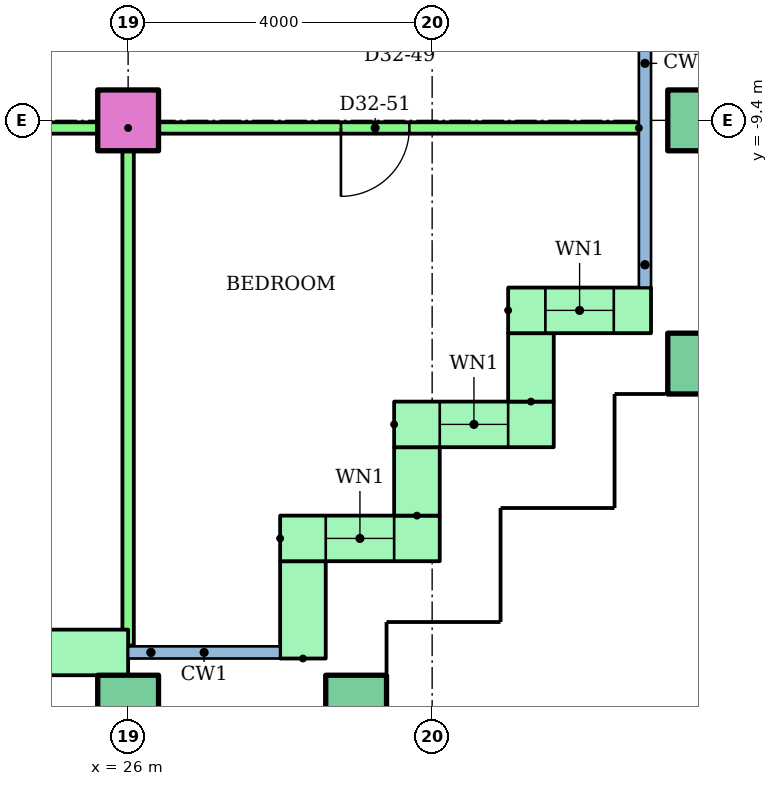
"""IFC4 building model, lengths in metres.
Left out: names, types, materials, properties, quantities, classifications, styles, units other than length and angle.
Written with IfcOpenShell. Run it as: python <this file> out.ifc"""

import sys

from ifc_helpers import new_model, si_unit, direction, frame, frame_2d, origin, origin_2d, place, context, subcontext, project, spatial, rectangle, hollow_rectangle, extrude, element, fill, save


model = new_model("IFC4")
c1 = context("Model", 3, precision=1e-05, world=origin(), true_north=direction((0.0, 1.0)))
c2 = subcontext(c1, "Body", "Model", "MODEL_VIEW")
j1 = project(units=[si_unit("LENGTHUNIT", "METRE"), si_unit("PLANEANGLEUNIT", "RADIAN")], contexts=[c1])
p1 = place(None, origin())
s1 = spatial("IfcSite", under=j1, at=p1, CompositionType="ELEMENT")
p2 = place(p1, origin())
s2 = spatial("IfcBuilding", under=s1, at=p2, CompositionType="ELEMENT")
p3 = place(p2, frame((0.0, 0.0, 126.2)))
s3 = spatial("IfcBuildingStorey", under=s2, at=p3, CompositionType="ELEMENT", Elevation=126.2)
for number, where in (
    (1, (26.0, -17.1, 0.0)),
    (2, (29.0, -17.1, 0.0)),
    (3, (33.5, -12.6, 0.0)),
):
    element("IfcColumn", number, at=place(p3, frame(where)), inside=s3, PredefinedType="COLUMN", context=c2, shape_type="SweptSolid", body=[
        extrude(hollow_rectangle(XDim=0.8, YDim=0.8, WallThickness=0.04, at=origin_2d()), origin(), (0.0, 0.0, 1.0), 3.2),
    ])
p4 = place(p3, frame((26.0, -9.4, 0.0)))
e4 = element("IfcColumn", 4, at=p4, inside=s3, PredefinedType="COLUMN", context=c2, shape_type="SweptSolid", body=[
    extrude(rectangle(XDim=0.8, YDim=0.8, at=origin_2d()), origin(), (0.0, 0.0, 1.0), 3.2),
])
p5 = place(p3, frame((33.5, -9.4, 0.0)))
e5 = element("IfcColumn", 5, at=p5, inside=s3, PredefinedType="COLUMN", context=c2, shape_type="SweptSolid", body=[
    extrude(hollow_rectangle(XDim=0.8, YDim=0.8, WallThickness=0.04, at=origin_2d()), origin(), (0.0, 0.0, 1.0), 3.2),
])
p6 = place(p3, frame((22.0, -16.4, 0.0)))
e6 = element("IfcWall", 6, at=p6, inside=s3, PredefinedType="STANDARD", context=c2, shape_type="SweptSolid", body=[
    extrude(rectangle(XDim=4.0, YDim=0.6, at=frame_2d((2.0, 0.0))), origin(), (0.0, 0.0, 1.0), 2.92),
])
p7 = place(p6, frame((1.4, 0.0, 0.0)))
e7 = element("IfcOpeningElement", 7, at=p7, cuts=e6, PredefinedType="OPENING", context=c2, shape_type="SweptSolid", body=[
    extrude(rectangle(XDim=1.2, YDim=2.1, at=frame_2d((0.6, 1.05))), frame((0.0, 0.31, 0.0), z_axis=(0.0, -1.0, 0.0), x_axis=(1.0, 0.0, 0.0)), (0.0, 0.0, 1.0), 0.62),
])
p8 = place(p3, frame((28.3, -16.48, 0.0), z_axis=(0.0, 0.0, 1.0), x_axis=(0.0, 1.0, 0.0)))
e8 = element("IfcWall", 8, at=p8, inside=s3, PredefinedType="STANDARD", context=c2, shape_type="SweptSolid", body=[
    extrude(rectangle(XDim=1.28, YDim=0.6, at=frame_2d((0.64, 0.0))), origin(), (0.0, 0.0, 1.0), 2.92),
])
p9 = place(p3, frame((28.0, -14.9, 0.0)))
e9 = element("IfcWall", 9, at=p9, inside=s3, PredefinedType="STANDARD", context=c2, shape_type="SweptSolid", body=[
    extrude(rectangle(XDim=2.1, YDim=0.6, at=frame_2d((1.05, 0.0))), origin(), (0.0, 0.0, 1.0), 2.92),
])
p10 = place(p9, frame((0.6, 0.0, 0.9)))
e10 = element("IfcOpeningElement", 10, at=p10, cuts=e9, PredefinedType="OPENING", context=c2, shape_type="SweptSolid", body=[
    extrude(rectangle(XDim=0.9, YDim=1.5, at=frame_2d((0.45, 0.75))), frame((0.0, 0.31, 0.0), z_axis=(0.0, -1.0, 0.0), x_axis=(1.0, 0.0, 0.0)), (0.0, 0.0, 1.0), 0.62),
])
p11 = place(p3, frame((29.8, -14.6, 0.0), z_axis=(0.0, 0.0, 1.0), x_axis=(0.0, 1.0, 0.0)))
e11 = element("IfcWall", 11, at=p11, inside=s3, PredefinedType="STANDARD", context=c2, shape_type="SweptSolid", body=[
    extrude(rectangle(XDim=0.9, YDim=0.6, at=frame_2d((0.45, 0.0))), origin(), (0.0, 0.0, 1.0), 2.92),
])
p12 = place(p3, frame((29.5, -13.4, 0.0)))
e12 = element("IfcWall", 12, at=p12, inside=s3, PredefinedType="STANDARD", context=c2, shape_type="SweptSolid", body=[
    extrude(rectangle(XDim=2.1, YDim=0.6, at=frame_2d((1.05, 0.0))), origin(), (0.0, 0.0, 1.0), 2.92),
])
p13 = place(p12, frame((0.6, 0.0, 0.9)))
e13 = element("IfcOpeningElement", 13, at=p13, cuts=e12, PredefinedType="OPENING", context=c2, shape_type="SweptSolid", body=[
    extrude(rectangle(XDim=0.9, YDim=1.5, at=frame_2d((0.45, 0.75))), frame((0.0, 0.31, 0.0), z_axis=(0.0, -1.0, 0.0), x_axis=(1.0, 0.0, 0.0)), (0.0, 0.0, 1.0), 0.62),
])
p14 = place(p3, frame((31.3, -13.1, 0.0), z_axis=(0.0, 0.0, 1.0), x_axis=(0.0, 1.0, 0.0)))
e14 = element("IfcWall", 14, at=p14, inside=s3, PredefinedType="STANDARD", context=c2, shape_type="SweptSolid", body=[
    extrude(rectangle(XDim=0.9, YDim=0.6, at=frame_2d((0.45, 0.0))), origin(), (0.0, 0.0, 1.0), 2.92),
])
p15 = place(p3, frame((31.0, -11.9, 0.0)))
e15 = element("IfcWall", 15, at=p15, inside=s3, PredefinedType="STANDARD", context=c2, shape_type="SweptSolid", body=[
    extrude(rectangle(XDim=1.88, YDim=0.6, at=frame_2d((0.94, 0.0))), origin(), (0.0, 0.0, 1.0), 2.92),
])
p16 = place(p15, frame((0.49, 0.0, 0.9)))
e16 = element("IfcOpeningElement", 16, at=p16, cuts=e15, PredefinedType="OPENING", context=c2, shape_type="SweptSolid", body=[
    extrude(rectangle(XDim=0.9, YDim=1.5, at=frame_2d((0.45, 0.75))), frame((0.0, 0.31, 0.0), z_axis=(0.0, -1.0, 0.0), x_axis=(1.0, 0.0, 0.0)), (0.0, 0.0, 1.0), 0.62),
])
p17 = place(p3, frame((32.72, -9.5, 0.0), z_axis=(0.0, 0.0, 1.0), x_axis=(-1.0, 0.0, 0.0)))
e17 = element("IfcWall", 17, at=p17, inside=s3, PredefinedType="PARTITIONING", context=c2, shape_type="SweptSolid", body=[
    extrude(rectangle(XDim=14.72, YDim=0.15, at=frame_2d((7.36, 0.0))), origin(), (0.0, 0.0, 1.0), 2.4),
])
p18 = place(p17, frame((10.22, 0.0, 0.0)))
e18 = element("IfcOpeningElement", 18, at=p18, cuts=e17, PredefinedType="OPENING", context=c2, shape_type="SweptSolid", body=[
    extrude(rectangle(XDim=1.0, YDim=2.1, at=frame_2d((0.5, 1.05))), frame((0.0, 0.085, 0.0), z_axis=(0.0, -1.0, 0.0), x_axis=(1.0, 0.0, 0.0)), (0.0, 0.0, 1.0), 0.17),
])
p19 = place(p17, frame((3.02, 0.0, 0.0)))
e19 = element("IfcOpeningElement", 19, at=p19, cuts=e17, PredefinedType="OPENING", context=c2, shape_type="SweptSolid", body=[
    extrude(rectangle(XDim=0.9, YDim=2.1, at=frame_2d((0.45, 1.05))), frame((0.0, 0.085, 0.0), z_axis=(0.0, -1.0, 0.0), x_axis=(1.0, 0.0, 0.0)), (0.0, 0.0, 1.0), 0.17),
])
p20 = place(p3, frame((26.0, -9.5, 0.0), z_axis=(0.0, 0.0, 1.0), x_axis=(0.0, -1.0, 0.0)))
e20 = element("IfcWall", 20, at=p20, inside=s3, PredefinedType="PARTITIONING", context=c2, shape_type="SweptSolid", body=[
    extrude(rectangle(XDim=6.81, YDim=0.15, at=frame_2d((3.405, 0.0))), origin(), (0.0, 0.0, 1.0), 2.4),
])
p21 = place(p10, origin())
e21 = element("IfcWindow", 21, at=p21, inside=s3, PartitioningType="SINGLE_PANEL", PredefinedType="WINDOW", context=c2, shape_type="SweptSolid", body=[
    extrude(rectangle(XDim=0.9, YDim=1.5, at=frame_2d((0.45, 0.75))), frame((0.0, 0.03, 0.0), z_axis=(0.0, -1.0, 0.0), x_axis=(1.0, 0.0, 0.0)), (0.0, 0.0, 1.0), 0.06),
])
fill(e10, e21)
p22 = place(p13, origin())
e22 = element("IfcWindow", 22, at=p22, inside=s3, PartitioningType="SINGLE_PANEL", PredefinedType="WINDOW", context=c2, shape_type="SweptSolid", body=[
    extrude(rectangle(XDim=0.9, YDim=1.5, at=frame_2d((0.45, 0.75))), frame((0.0, 0.03, 0.0), z_axis=(0.0, -1.0, 0.0), x_axis=(1.0, 0.0, 0.0)), (0.0, 0.0, 1.0), 0.06),
])
fill(e13, e22)
p23 = place(p16, origin())
e23 = element("IfcWindow", 23, at=p23, inside=s3, PartitioningType="SINGLE_PANEL", PredefinedType="WINDOW", context=c2, shape_type="SweptSolid", body=[
    extrude(rectangle(XDim=0.9, YDim=1.5, at=frame_2d((0.45, 0.75))), frame((0.0, 0.03, 0.0), z_axis=(0.0, -1.0, 0.0), x_axis=(1.0, 0.0, 0.0)), (0.0, 0.0, 1.0), 0.06),
])
fill(e16, e23)
p24 = place(p19, origin())
e24 = element("IfcDoor", 24, at=p24, inside=s3, OperationType="SINGLE_SWING_RIGHT", PredefinedType="DOOR", context=c2, shape_type="SweptSolid", body=[
    extrude(rectangle(XDim=0.9, YDim=2.1, at=frame_2d((0.45, 1.05))), frame((0.0, 0.025, 0.0), z_axis=(0.0, -1.0, 0.0), x_axis=(1.0, 0.0, 0.0)), (0.0, 0.0, 1.0), 0.05),
])
fill(e19, e24)
save(model, sys.argv[1])
